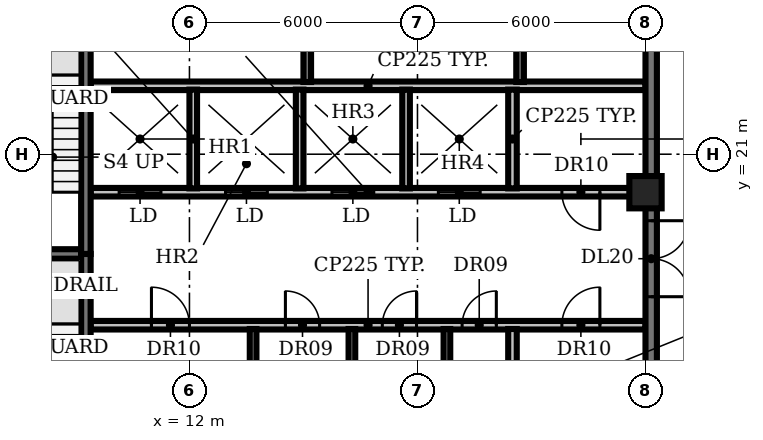
"""IFC4 building model, lengths in metres.
Left out: names, types, materials, properties, quantities, classifications, styles, units other than length and angle.
Written with IfcOpenShell. Run it as: python <this file> out.ifc"""

import sys

from ifc_helpers import new_model, si_unit, direction, frame, frame_2d, origin, origin_2d, place, context, subcontext, project, spatial, rectangle, circle, extrude, element, fill, save


model = new_model("IFC4")
c1 = context("Model", 3, precision=1e-05, world=origin(), true_north=direction((0.0, 1.0)))
c2 = subcontext(c1, "Body", "Model", "MODEL_VIEW")
j1 = project(units=[si_unit("LENGTHUNIT", "METRE"), si_unit("PLANEANGLEUNIT", "RADIAN")], contexts=[c1])
p1 = place(None, origin())
s1 = spatial("IfcSite", under=j1, at=p1, CompositionType="ELEMENT")
p2 = place(p1, origin())
s2 = spatial("IfcBuilding", under=s1, at=p2, CompositionType="ELEMENT")
p3 = place(p2, frame((0.0, 0.0, 310.4)))
s3 = spatial("IfcBuildingStorey", under=s2, at=p3, CompositionType="ELEMENT", Elevation=310.4)
p4 = place(p3, frame((24.0, 20.0, 0.0), z_axis=(0.0, 0.0, 1.0), x_axis=(1.0, 0.0, 0.0)))
e1 = element("IfcColumn", 1, at=p4, inside=s3, PredefinedType="COLUMN", context=c2, shape_type="SweptSolid", body=[
    extrude(circle(Radius=0.425, at=origin_2d()), origin(), (0.0, 0.0, 1.0), 3.9),
])
p5 = place(p3, frame((9.4, 16.5, 0.0), z_axis=(0.0, 0.0, 1.0), x_axis=(1.0, 0.0, 0.0)))
e2 = element("IfcWall", 2, at=p5, inside=s3, PredefinedType="PARTITIONING", context=c2, shape_type="SweptSolid", body=[
    extrude(rectangle(XDim=14.6, YDim=0.225, at=frame_2d((7.3, 0.0))), origin(), (0.0, 0.0, 1.0), 3.9),
])
p6 = place(p5, frame((1.6, 0.0, 0.0)))
e3 = element("IfcOpeningElement", 3, at=p6, cuts=e2, PredefinedType="OPENING", context=c2, shape_type="SweptSolid", body=[
    extrude(rectangle(XDim=1.0, YDim=2.1, at=frame_2d((0.5, 1.05))), frame((0.0, 0.123, 0.0), z_axis=(0.0, -1.0, 0.0), x_axis=(1.0, 0.0, 0.0)), (0.0, 0.0, 1.0), 0.245),
])
p7 = place(p5, frame((5.125, 0.0, 0.0)))
e4 = element("IfcOpeningElement", 4, at=p7, cuts=e2, PredefinedType="OPENING", context=c2, shape_type="SweptSolid", body=[
    extrude(rectangle(XDim=0.9, YDim=2.1, at=frame_2d((0.45, 1.05))), frame((0.0, 0.123, 0.0), z_axis=(0.0, -1.0, 0.0), x_axis=(1.0, 0.0, 0.0)), (0.0, 0.0, 1.0), 0.245),
])
p8 = place(p5, frame((7.675, 0.0, 0.0)))
e5 = element("IfcOpeningElement", 5, at=p8, cuts=e2, PredefinedType="OPENING", context=c2, shape_type="SweptSolid", body=[
    extrude(rectangle(XDim=0.9, YDim=2.1, at=frame_2d((0.45, 1.05))), frame((0.0, 0.123, 0.0), z_axis=(0.0, -1.0, 0.0), x_axis=(1.0, 0.0, 0.0)), (0.0, 0.0, 1.0), 0.245),
])
p9 = place(p5, frame((9.775, 0.0, 0.0)))
e6 = element("IfcOpeningElement", 6, at=p9, cuts=e2, PredefinedType="OPENING", context=c2, shape_type="SweptSolid", body=[
    extrude(rectangle(XDim=0.9, YDim=2.1, at=frame_2d((0.45, 1.05))), frame((0.0, 0.123, 0.0), z_axis=(0.0, -1.0, 0.0), x_axis=(1.0, 0.0, 0.0)), (0.0, 0.0, 1.0), 0.245),
])
p10 = place(p5, frame((12.4, 0.0, 0.0)))
e7 = element("IfcOpeningElement", 7, at=p10, cuts=e2, PredefinedType="OPENING", context=c2, shape_type="SweptSolid", body=[
    extrude(rectangle(XDim=1.0, YDim=2.1, at=frame_2d((0.5, 1.05))), frame((0.0, 0.123, 0.0), z_axis=(0.0, -1.0, 0.0), x_axis=(1.0, 0.0, 0.0)), (0.0, 0.0, 1.0), 0.245),
])
p11 = place(p3, frame((6.0, 18.375, 0.0), z_axis=(0.0, 0.0, 1.0), x_axis=(1.0, 0.0, 0.0)))
e8 = element("IfcWall", 8, at=p11, inside=s3, PredefinedType="SHEAR", context=c2, shape_type="SweptSolid", body=[
    extrude(rectangle(XDim=3.15, YDim=0.25, at=frame_2d((1.575, 0.0))), origin(), (0.0, 0.0, 1.0), 3.9),
])
p12 = place(p3, frame((24.0, 20.0, 0.0), z_axis=(0.0, 0.0, 1.0), x_axis=(-1.0, 0.0, 0.0)))
e9 = element("IfcWall", 9, at=p12, inside=s3, PredefinedType="PARTITIONING", context=c2, shape_type="SweptSolid", body=[
    extrude(rectangle(XDim=14.6, YDim=0.225, at=frame_2d((7.3, 0.0))), origin(), (0.0, 0.0, 1.0), 3.9),
])
p13 = place(p12, frame((12.75, 0.0, 0.0)))
e10 = element("IfcOpeningElement", 10, at=p13, cuts=e9, PredefinedType="OPENING", context=c2, shape_type="SweptSolid", body=[
    extrude(rectangle(XDim=1.1, YDim=2.1, at=frame_2d((0.55, 1.05))), frame((0.0, 0.123, 0.0), z_axis=(0.0, -1.0, 0.0), x_axis=(1.0, 0.0, 0.0)), (0.0, 0.0, 1.0), 0.245),
])
p14 = place(p12, frame((9.95, 0.0, 0.0)))
e11 = element("IfcOpeningElement", 11, at=p14, cuts=e9, PredefinedType="OPENING", context=c2, shape_type="SweptSolid", body=[
    extrude(rectangle(XDim=1.1, YDim=2.1, at=frame_2d((0.55, 1.05))), frame((0.0, 0.123, 0.0), z_axis=(0.0, -1.0, 0.0), x_axis=(1.0, 0.0, 0.0)), (0.0, 0.0, 1.0), 0.245),
])
p15 = place(p12, frame((7.15, 0.0, 0.0)))
e12 = element("IfcOpeningElement", 12, at=p15, cuts=e9, PredefinedType="OPENING", context=c2, shape_type="SweptSolid", body=[
    extrude(rectangle(XDim=1.1, YDim=2.1, at=frame_2d((0.55, 1.05))), frame((0.0, 0.123, 0.0), z_axis=(0.0, -1.0, 0.0), x_axis=(1.0, 0.0, 0.0)), (0.0, 0.0, 1.0), 0.245),
])
p16 = place(p12, frame((4.35, 0.0, 0.0)))
e13 = element("IfcOpeningElement", 13, at=p16, cuts=e9, PredefinedType="OPENING", context=c2, shape_type="SweptSolid", body=[
    extrude(rectangle(XDim=1.1, YDim=2.1, at=frame_2d((0.55, 1.05))), frame((0.0, 0.123, 0.0), z_axis=(0.0, -1.0, 0.0), x_axis=(1.0, 0.0, 0.0)), (0.0, 0.0, 1.0), 0.245),
])
p17 = place(p12, frame((1.2, 0.0, 0.0)))
e14 = element("IfcOpeningElement", 14, at=p17, cuts=e9, PredefinedType="OPENING", context=c2, shape_type="SweptSolid", body=[
    extrude(rectangle(XDim=1.0, YDim=2.1, at=frame_2d((0.5, 1.05))), frame((0.0, 0.123, 0.0), z_axis=(0.0, -1.0, 0.0), x_axis=(1.0, 0.0, 0.0)), (0.0, 0.0, 1.0), 0.245),
])
p18 = place(p3, frame((9.4, 22.8, 0.0), z_axis=(0.0, 0.0, 1.0), x_axis=(1.0, 0.0, 0.0)))
e15 = element("IfcWall", 15, at=p18, inside=s3, PredefinedType="PARTITIONING", context=c2, shape_type="SweptSolid", body=[
    extrude(rectangle(XDim=14.6, YDim=0.225, at=frame_2d((7.3, 0.0))), origin(), (0.0, 0.0, 1.0), 3.9),
])
p19 = place(p3, frame((9.275, 18.375, 0.0), z_axis=(0.0, 0.0, 1.0), x_axis=(0.0, -1.0, 0.0)))
e16 = element("IfcWall", 16, at=p19, inside=s3, PredefinedType="SHEAR", context=c2, shape_type="SweptSolid", body=[
    extrude(rectangle(XDim=6.55, YDim=0.25, at=frame_2d((3.275, 0.0))), origin(), (0.0, 0.0, 1.0), 3.9),
])
p20 = place(p19, frame((5.075, 0.0, 0.0)))
e17 = element("IfcOpeningElement", 17, at=p20, cuts=e16, PredefinedType="OPENING", context=c2, shape_type="SweptSolid", body=[
    extrude(rectangle(XDim=1.0, YDim=2.1, at=frame_2d((0.5, 1.05))), frame((0.0, 0.135, 0.0), z_axis=(0.0, -1.0, 0.0), x_axis=(1.0, 0.0, 0.0)), (0.0, 0.0, 1.0), 0.27),
])
p21 = place(p3, frame((9.275, 18.375, 0.0), z_axis=(0.0, 0.0, 1.0), x_axis=(0.0, 1.0, 0.0)))
e18 = element("IfcWall", 18, at=p21, inside=s3, PredefinedType="SHEAR", context=c2, shape_type="SweptSolid", body=[
    extrude(rectangle(XDim=6.425, YDim=0.25, at=frame_2d((3.212, 0.0))), origin(), (0.0, 0.0, 1.0), 3.9),
])
p22 = place(p3, frame((12.1, 20.1, 0.0), z_axis=(0.0, 0.0, 1.0), x_axis=(0.0, 1.0, 0.0)))
e19 = element("IfcWall", 19, at=p22, inside=s3, PredefinedType="SOLIDWALL", context=c2, shape_type="SweptSolid", body=[
    extrude(rectangle(XDim=2.6, YDim=0.2, at=frame_2d((1.3, 0.0))), origin(), (0.0, 0.0, 1.0), 3.9),
])
p23 = place(p3, frame((13.675, 13.8, 0.0), z_axis=(0.0, 0.0, 1.0), x_axis=(0.0, 1.0, 0.0)))
e20 = element("IfcWall", 20, at=p23, inside=s3, PredefinedType="PARTITIONING", context=c2, shape_type="SweptSolid", body=[
    extrude(rectangle(XDim=2.6, YDim=0.175, at=frame_2d((1.3, 0.0))), origin(), (0.0, 0.0, 1.0), 3.9),
])
p24 = place(p3, frame((14.9, 20.1, 0.0), z_axis=(0.0, 0.0, 1.0), x_axis=(0.0, 1.0, 0.0)))
e21 = element("IfcWall", 21, at=p24, inside=s3, PredefinedType="SOLIDWALL", context=c2, shape_type="SweptSolid", body=[
    extrude(rectangle(XDim=2.6, YDim=0.2, at=frame_2d((1.3, 0.0))), origin(), (0.0, 0.0, 1.0), 3.9),
])
p25 = place(p3, frame((15.1, 22.9, 0.0), z_axis=(0.0, 0.0, 1.0), x_axis=(0.0, 1.0, 0.0)))
e22 = element("IfcWall", 22, at=p25, inside=s3, PredefinedType="SHEAR", context=c2, shape_type="SweptSolid", body=[
    extrude(rectangle(XDim=1.9, YDim=0.2, at=frame_2d((0.95, 0.0))), origin(), (0.0, 0.0, 1.0), 3.9),
])
p26 = place(p3, frame((16.275, 13.8, 0.0), z_axis=(0.0, 0.0, 1.0), x_axis=(0.0, 1.0, 0.0)))
e23 = element("IfcWall", 23, at=p26, inside=s3, PredefinedType="PARTITIONING", context=c2, shape_type="SweptSolid", body=[
    extrude(rectangle(XDim=2.6, YDim=0.175, at=frame_2d((1.3, 0.0))), origin(), (0.0, 0.0, 1.0), 3.9),
])
p27 = place(p3, frame((17.7, 20.1, 0.0), z_axis=(0.0, 0.0, 1.0), x_axis=(0.0, 1.0, 0.0)))
e24 = element("IfcWall", 24, at=p27, inside=s3, PredefinedType="SOLIDWALL", context=c2, shape_type="SweptSolid", body=[
    extrude(rectangle(XDim=2.6, YDim=0.2, at=frame_2d((1.3, 0.0))), origin(), (0.0, 0.0, 1.0), 3.9),
])
p28 = place(p3, frame((18.775, 13.8, 0.0), z_axis=(0.0, 0.0, 1.0), x_axis=(0.0, 1.0, 0.0)))
e25 = element("IfcWall", 25, at=p28, inside=s3, PredefinedType="PARTITIONING", context=c2, shape_type="SweptSolid", body=[
    extrude(rectangle(XDim=2.6, YDim=0.175, at=frame_2d((1.3, 0.0))), origin(), (0.0, 0.0, 1.0), 3.9),
])
for number, where, z_axis, x_axis in (
    (26, (20.5, 13.8, 0.0), (0.0, 0.0, 1.0), (0.0, 1.0, 0.0)),
    (27, (20.5, 20.1, 0.0), (0.0, 0.0, 1.0), (0.0, 1.0, 0.0)),
):
    element("IfcWall", number, at=place(p3, frame(where, z_axis=z_axis, x_axis=x_axis)), inside=s3, PredefinedType="PARTITIONING", context=c2, shape_type="SweptSolid", body=[
        extrude(rectangle(XDim=2.6, YDim=0.225, at=frame_2d((1.3, 0.0))), origin(), (0.0, 0.0, 1.0), 3.9),
    ])
p29 = place(p3, frame((20.7, 22.9, 0.0), z_axis=(0.0, 0.0, 1.0), x_axis=(0.0, 1.0, 0.0)))
e28 = element("IfcWall", 28, at=p29, inside=s3, PredefinedType="SHEAR", context=c2, shape_type="SweptSolid", body=[
    extrude(rectangle(XDim=1.9, YDim=0.2, at=frame_2d((0.95, 0.0))), origin(), (0.0, 0.0, 1.0), 3.9),
])
p30 = place(p3, frame((24.15, 25.655, 0.0), z_axis=(0.0, 0.0, 1.0), x_axis=(0.0, -1.0, 0.0)))
e29 = element("IfcWall", 29, at=p30, inside=s3, PredefinedType="SHEAR", context=c2, shape_type="SweptSolid", body=[
    extrude(rectangle(XDim=20.555, YDim=0.3, at=frame_2d((10.277, 0.0))), origin(), (0.0, 0.0, 1.0), 3.9),
])
p31 = place(p30, frame((18.505, 0.0, 0.0)))
e30 = element("IfcOpeningElement", 30, at=p31, cuts=e29, PredefinedType="OPENING", context=c2, shape_type="SweptSolid", body=[
    extrude(rectangle(XDim=1.5, YDim=2.1, at=frame_2d((0.75, 1.05))), frame((0.0, 0.16, 0.0), z_axis=(0.0, -1.0, 0.0), x_axis=(1.0, 0.0, 0.0)), (0.0, 0.0, 1.0), 0.32),
])
p32 = place(p30, frame((12.405, 0.0, 0.0)))
e31 = element("IfcOpeningElement", 31, at=p32, cuts=e29, PredefinedType="OPENING", context=c2, shape_type="SweptSolid", body=[
    extrude(rectangle(XDim=0.9, YDim=2.1, at=frame_2d((0.45, 1.05))), frame((0.0, 0.16, 0.0), z_axis=(0.0, -1.0, 0.0), x_axis=(1.0, 0.0, 0.0)), (0.0, 0.0, 1.0), 0.32),
])
p33 = place(p30, frame((6.405, 0.0, 0.0)))
e32 = element("IfcOpeningElement", 32, at=p33, cuts=e29, PredefinedType="OPENING", context=c2, shape_type="SweptSolid", body=[
    extrude(rectangle(XDim=2.0, YDim=2.1, at=frame_2d((1.0, 1.05))), frame((0.0, 0.16, 0.0), z_axis=(0.0, -1.0, 0.0), x_axis=(1.0, 0.0, 0.0)), (0.0, 0.0, 1.0), 0.32),
])
p34 = place(p6, origin())
e33 = element("IfcDoor", 33, at=p34, inside=s3, OperationType="SINGLE_SWING_LEFT", PredefinedType="DOOR", context=c2, shape_type="SweptSolid", body=[
    extrude(rectangle(XDim=1.0, YDim=2.1, at=frame_2d((0.5, 1.05))), frame((0.0, 0.025, 0.0), z_axis=(0.0, -1.0, 0.0), x_axis=(1.0, 0.0, 0.0)), (0.0, 0.0, 1.0), 0.05),
])
fill(e3, e33)
p35 = place(p7, origin())
e34 = element("IfcDoor", 34, at=p35, inside=s3, OperationType="SINGLE_SWING_LEFT", PredefinedType="DOOR", context=c2, shape_type="SweptSolid", body=[
    extrude(rectangle(XDim=0.9, YDim=2.1, at=frame_2d((0.45, 1.05))), frame((0.0, 0.025, 0.0), z_axis=(0.0, -1.0, 0.0), x_axis=(1.0, 0.0, 0.0)), (0.0, 0.0, 1.0), 0.05),
])
fill(e4, e34)
p36 = place(p8, origin())
e35 = element("IfcDoor", 35, at=p36, inside=s3, OperationType="SINGLE_SWING_RIGHT", PredefinedType="DOOR", context=c2, shape_type="SweptSolid", body=[
    extrude(rectangle(XDim=0.9, YDim=2.1, at=frame_2d((0.45, 1.05))), frame((0.0, 0.025, 0.0), z_axis=(0.0, -1.0, 0.0), x_axis=(1.0, 0.0, 0.0)), (0.0, 0.0, 1.0), 0.05),
])
fill(e5, e35)
p37 = place(p9, origin())
e36 = element("IfcDoor", 36, at=p37, inside=s3, OperationType="SINGLE_SWING_RIGHT", PredefinedType="DOOR", context=c2, shape_type="SweptSolid", body=[
    extrude(rectangle(XDim=0.9, YDim=2.1, at=frame_2d((0.45, 1.05))), frame((0.0, 0.025, 0.0), z_axis=(0.0, -1.0, 0.0), x_axis=(1.0, 0.0, 0.0)), (0.0, 0.0, 1.0), 0.05),
])
fill(e6, e36)
p38 = place(p10, origin())
e37 = element("IfcDoor", 37, at=p38, inside=s3, OperationType="SINGLE_SWING_RIGHT", PredefinedType="DOOR", context=c2, shape_type="SweptSolid", body=[
    extrude(rectangle(XDim=1.0, YDim=2.1, at=frame_2d((0.5, 1.05))), frame((0.0, 0.025, 0.0), z_axis=(0.0, -1.0, 0.0), x_axis=(1.0, 0.0, 0.0)), (0.0, 0.0, 1.0), 0.05),
])
fill(e7, e37)
p39 = place(p13, origin())
e38 = element("IfcDoor", 38, at=p39, inside=s3, OperationType="DOUBLE_DOOR_SLIDING", PredefinedType="DOOR", context=c2, shape_type="SweptSolid", body=[
    extrude(rectangle(XDim=1.1, YDim=2.1, at=frame_2d((0.55, 1.05))), frame((0.0, 0.025, 0.0), z_axis=(0.0, -1.0, 0.0), x_axis=(1.0, 0.0, 0.0)), (0.0, 0.0, 1.0), 0.05),
])
fill(e10, e38)
p40 = place(p14, origin())
e39 = element("IfcDoor", 39, at=p40, inside=s3, OperationType="DOUBLE_DOOR_SLIDING", PredefinedType="DOOR", context=c2, shape_type="SweptSolid", body=[
    extrude(rectangle(XDim=1.1, YDim=2.1, at=frame_2d((0.55, 1.05))), frame((0.0, 0.025, 0.0), z_axis=(0.0, -1.0, 0.0), x_axis=(1.0, 0.0, 0.0)), (0.0, 0.0, 1.0), 0.05),
])
fill(e11, e39)
p41 = place(p15, origin())
e40 = element("IfcDoor", 40, at=p41, inside=s3, OperationType="DOUBLE_DOOR_SLIDING", PredefinedType="DOOR", context=c2, shape_type="SweptSolid", body=[
    extrude(rectangle(XDim=1.1, YDim=2.1, at=frame_2d((0.55, 1.05))), frame((0.0, 0.025, 0.0), z_axis=(0.0, -1.0, 0.0), x_axis=(1.0, 0.0, 0.0)), (0.0, 0.0, 1.0), 0.05),
])
fill(e12, e40)
p42 = place(p16, origin())
e41 = element("IfcDoor", 41, at=p42, inside=s3, OperationType="DOUBLE_DOOR_SLIDING", PredefinedType="DOOR", context=c2, shape_type="SweptSolid", body=[
    extrude(rectangle(XDim=1.1, YDim=2.1, at=frame_2d((0.55, 1.05))), frame((0.0, 0.025, 0.0), z_axis=(0.0, -1.0, 0.0), x_axis=(1.0, 0.0, 0.0)), (0.0, 0.0, 1.0), 0.05),
])
fill(e13, e41)
p43 = place(p17, origin())
e42 = element("IfcDoor", 42, at=p43, inside=s3, OperationType="SINGLE_SWING_LEFT", PredefinedType="DOOR", context=c2, shape_type="SweptSolid", body=[
    extrude(rectangle(XDim=1.0, YDim=2.1, at=frame_2d((0.5, 1.05))), frame((0.0, 0.025, 0.0), z_axis=(0.0, -1.0, 0.0), x_axis=(1.0, 0.0, 0.0)), (0.0, 0.0, 1.0), 0.05),
])
fill(e14, e42)
p44 = place(p33, origin())
e43 = element("IfcDoor", 43, at=p44, inside=s3, OperationType="DOUBLE_DOOR_SINGLE_SWING", PredefinedType="DOOR", context=c2, shape_type="SweptSolid", body=[
    extrude(rectangle(XDim=2.0, YDim=2.1, at=frame_2d((1.0, 1.05))), frame((0.0, 0.025, 0.0), z_axis=(0.0, -1.0, 0.0), x_axis=(1.0, 0.0, 0.0)), (0.0, 0.0, 1.0), 0.05),
])
fill(e32, e43)
save(model, sys.argv[1])
